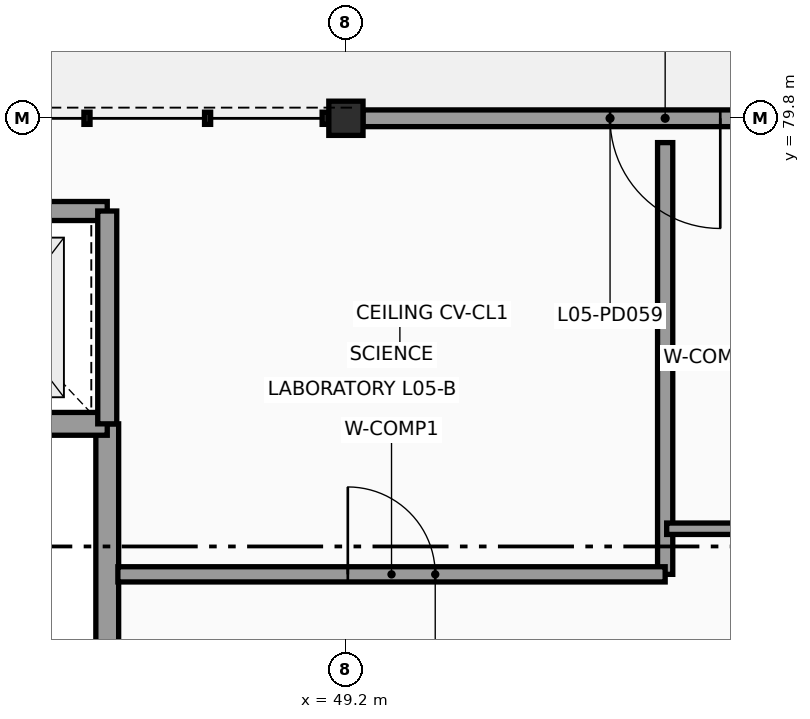
"""IFC4 building model, lengths in metres.
Left out: names, types, materials, properties, quantities, classifications, styles, units other than length and angle.
Written with IfcOpenShell. Run it as: python <this file> out.ifc"""

import sys

from ifc_helpers import new_model, si_unit, direction, frame, frame_2d, origin, origin_2d, place, context, subcontext, project, spatial, rectangle, extrude, element, fill, save


model = new_model("IFC4")
c1 = context("Model", 3, precision=1e-05, world=origin(), true_north=direction((0.0, 1.0)))
c2 = subcontext(c1, "Body", "Model", "MODEL_VIEW")
j1 = project(units=[si_unit("LENGTHUNIT", "METRE"), si_unit("PLANEANGLEUNIT", "RADIAN")], contexts=[c1])
p1 = place(None, origin())
s1 = spatial("IfcSite", under=j1, at=p1, CompositionType="ELEMENT")
p2 = place(p1, origin())
s2 = spatial("IfcBuilding", under=s1, at=p2, CompositionType="ELEMENT")
p3 = place(p2, frame((0.0, 0.0, 18.6)))
s3 = spatial("IfcBuildingStorey", under=s2, at=p3, CompositionType="ELEMENT", Elevation=18.6)
p4 = place(p3, frame((49.2, 79.8, 0.0), z_axis=(0.0, 0.0, 1.0), x_axis=(1.0, 0.0, 0.0)))
e1 = element("IfcColumn", 1, at=p4, inside=s3, PredefinedType="COLUMN", context=c2, shape_type="SweptSolid", body=[
    extrude(rectangle(XDim=0.45, YDim=0.45, at=origin_2d()), origin(), (0.0, 0.0, 1.0), 3.35),
])
p5 = place(p3, frame((49.423, 79.8, 0.0), z_axis=(0.0, 0.0, 1.0), x_axis=(1.0, 0.0, 0.0)))
e2 = element("IfcWall", 2, at=p5, inside=s3, PredefinedType="SOLIDWALL", context=c2, shape_type="SweptSolid", body=[
    extrude(rectangle(XDim=7.954, YDim=0.22, at=frame_2d((3.977, 0.0))), origin(), (0.0, 0.0, 1.0), 2.65),
])
p6 = place(p5, frame((3.252, 0.0, 0.0)))
e3 = element("IfcOpeningElement", 3, at=p6, cuts=e2, PredefinedType="OPENING", context=c2, shape_type="SweptSolid", body=[
    extrude(rectangle(XDim=1.45, YDim=2.2, at=frame_2d((0.725, 1.1))), frame((0.0, 0.12, 0.0), z_axis=(0.0, -1.0, 0.0), x_axis=(1.0, 0.0, 0.0)), (0.0, 0.0, 1.0), 0.24),
])
p7 = place(p3, frame((46.06, 71.54, 0.0), z_axis=(0.0, 0.0, 1.0), x_axis=(0.0, 1.0, 0.0)))
e4 = element("IfcWall", 4, at=p7, inside=s3, PredefinedType="SHEAR", context=c2, shape_type="SweptSolid", body=[
    extrude(rectangle(XDim=4.24, YDim=0.3, at=frame_2d((2.12, 0.0))), origin(), (0.0, 0.0, 1.0), 3.35),
])
p8 = place(p3, frame((46.06, 75.78, 0.0), z_axis=(0.0, 0.0, 1.0), x_axis=(-1.0, 0.0, 0.0)))
e5 = element("IfcWall", 5, at=p8, inside=s3, PredefinedType="SHEAR", context=c2, shape_type="SweptSolid", body=[
    extrude(rectangle(XDim=8.12, YDim=0.3, at=frame_2d((4.06, 0.0))), origin(), (0.0, 0.0, 1.0), 3.35),
])
p9 = place(p8, frame((6.27, 0.0, 0.0)))
e6 = element("IfcOpeningElement", 6, at=p9, cuts=e5, PredefinedType="OPENING", context=c2, shape_type="SweptSolid", body=[
    extrude(rectangle(XDim=1.35, YDim=2.15, at=frame_2d((0.675, 1.075))), frame((0.0, 0.16, 0.0), z_axis=(0.0, -1.0, 0.0), x_axis=(1.0, 0.0, 0.0)), (0.0, 0.0, 1.0), 0.32),
])
p10 = place(p3, frame((46.06, 78.58, 0.0), z_axis=(0.0, 0.0, 1.0), x_axis=(-1.0, 0.0, 0.0)))
e7 = element("IfcWall", 7, at=p10, inside=s3, PredefinedType="SHEAR", context=c2, shape_type="SweptSolid", body=[
    extrude(rectangle(XDim=2.74, YDim=0.25, at=frame_2d((1.37, 0.0))), origin(), (0.0, 0.0, 1.0), 3.35),
])
p11 = place(p3, frame((46.06, 75.78, 0.0), z_axis=(0.0, 0.0, 1.0), x_axis=(0.0, 1.0, 0.0)))
e8 = element("IfcWall", 8, at=p11, inside=s3, PredefinedType="SHEAR", context=c2, shape_type="SweptSolid", body=[
    extrude(rectangle(XDim=2.8, YDim=0.25, at=frame_2d((1.4, 0.0))), origin(), (0.0, 0.0, 1.0), 3.35),
])
p12 = place(p3, frame((53.4, 79.48, 0.0), z_axis=(0.0, 0.0, 1.0), x_axis=(0.0, -1.0, 0.0)))
e9 = element("IfcWall", 9, at=p12, inside=s3, PredefinedType="PARTITIONING", context=c2, shape_type="SweptSolid", body=[
    extrude(rectangle(XDim=5.68, YDim=0.2, at=frame_2d((2.84, 0.0))), origin(), (0.0, 0.0, 1.0), 3.05),
])
p13 = place(p3, frame((53.4, 73.8, 0.0), z_axis=(0.0, 0.0, 1.0), x_axis=(-1.0, 0.0, 0.0)))
e10 = element("IfcWall", 10, at=p13, inside=s3, PredefinedType="PARTITIONING", context=c2, shape_type="SweptSolid", body=[
    extrude(rectangle(XDim=7.2, YDim=0.2, at=frame_2d((3.6, 0.0))), origin(), (0.0, 0.0, 1.0), 2.75),
])
p14 = place(p13, frame((3.025, 0.0, 0.0)))
e11 = element("IfcOpeningElement", 11, at=p14, cuts=e10, PredefinedType="OPENING", context=c2, shape_type="SweptSolid", body=[
    extrude(rectangle(XDim=1.15, YDim=2.15, at=frame_2d((0.575, 1.075))), frame((0.0, 0.11, 0.0), z_axis=(0.0, -1.0, 0.0), x_axis=(1.0, 0.0, 0.0)), (0.0, 0.0, 1.0), 0.22),
])
p15 = place(p3, frame((74.08, 74.4, 0.0), z_axis=(0.0, 0.0, 1.0), x_axis=(-1.0, 0.0, 0.0)))
e12 = element("IfcWall", 12, at=p15, inside=s3, PredefinedType="PARTITIONING", context=c2, shape_type="SweptSolid", body=[
    extrude(rectangle(XDim=20.66, YDim=0.15, at=frame_2d((10.33, 0.0))), origin(), (0.0, 0.0, 1.0), 2.85),
])
p16 = place(p15, frame((9.805, 0.0, 0.0)))
e13 = element("IfcOpeningElement", 13, at=p16, cuts=e12, PredefinedType="OPENING", context=c2, shape_type="SweptSolid", body=[
    extrude(rectangle(XDim=1.05, YDim=2.15, at=frame_2d((0.525, 1.075))), frame((0.0, 0.085, 0.0), z_axis=(0.0, -1.0, 0.0), x_axis=(1.0, 0.0, 0.0)), (0.0, 0.0, 1.0), 0.17),
])
p17 = place(p6, origin())
e14 = element("IfcDoor", 14, at=p17, inside=s3, OperationType="SINGLE_SWING_RIGHT", PredefinedType="DOOR", context=c2, shape_type="SweptSolid", body=[
    extrude(rectangle(XDim=1.45, YDim=2.2, at=frame_2d((0.725, 1.1))), frame((0.0, 0.025, 0.0), z_axis=(0.0, -1.0, 0.0), x_axis=(1.0, 0.0, 0.0)), (0.0, 0.0, 1.0), 0.05),
])
fill(e3, e14)
p18 = place(p14, origin())
e15 = element("IfcDoor", 15, at=p18, inside=s3, OperationType="SINGLE_SWING_RIGHT", PredefinedType="DOOR", context=c2, shape_type="SweptSolid", body=[
    extrude(rectangle(XDim=1.15, YDim=2.15, at=frame_2d((0.575, 1.075))), frame((0.0, 0.025, 0.0), z_axis=(0.0, -1.0, 0.0), x_axis=(1.0, 0.0, 0.0)), (0.0, 0.0, 1.0), 0.05),
])
fill(e11, e15)
save(model, sys.argv[1])
